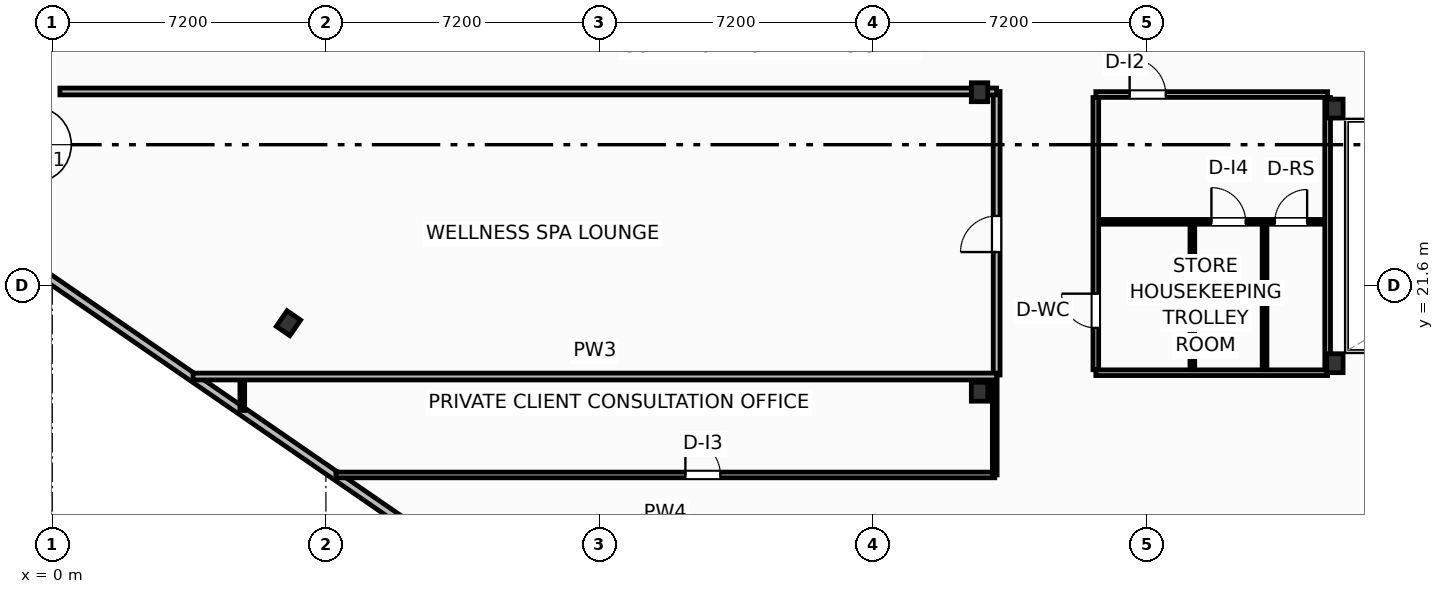
"""IFC4 building model, lengths in metres.
Left out: names, types, materials, properties, quantities, classifications, styles, units other than length and angle.
Written with IfcOpenShell. Run it as: python <this file> out.ifc"""

import sys

from ifc_helpers import new_model, si_unit, direction, frame, frame_2d, origin, origin_2d, place, context, subcontext, project, spatial, rectangle, i_section, extrude, element, fill, save


model = new_model("IFC4")
c1 = context("Model", 3, precision=1e-05, world=origin(), true_north=direction((0.0, 1.0)))
c2 = subcontext(c1, "Body", "Model", "MODEL_VIEW")
j1 = project(units=[si_unit("LENGTHUNIT", "METRE"), si_unit("PLANEANGLEUNIT", "RADIAN")], contexts=[c1])
p1 = place(None, origin())
s1 = spatial("IfcSite", under=j1, at=p1, CompositionType="ELEMENT")
p2 = place(p1, origin())
s2 = spatial("IfcBuilding", under=s1, at=p2, CompositionType="ELEMENT")
p3 = place(p2, frame((0.0, 0.0, 60.3)))
s3 = spatial("IfcBuildingStorey", under=s2, at=p3, CompositionType="ELEMENT", Elevation=60.3)
for number, where, z_axis, x_axis in (
    (1, (33.75, 19.55, 0.0), (0.0, 0.0, 1.0), (1.0, 0.0, 0.0)),
    (2, (33.75, 26.25, 0.0), (0.0, 0.0, 1.0), (1.0, 0.0, 0.0)),
    (3, (24.4, 18.8, 0.0), (0.0, 0.0, 1.0), (1.0, 0.0, 0.0)),
    (4, (24.4, 26.68, 0.0), (0.0, 0.0, 1.0), (1.0, 0.0, 0.0)),
    (5, (6.215, 20.603, 0.0), (0.0, 0.0, 1.0), (0.824, -0.567, 0.0)),
):
    element("IfcColumn", number, at=place(p3, frame(where, z_axis=z_axis, x_axis=x_axis)), inside=s3, PredefinedType="COLUMN", context=c2, shape_type="SweptSolid", body=[
        extrude(i_section(OverallWidth=0.432, OverallDepth=0.498, WebThickness=0.056, FlangeThickness=0.089, FilletRadius=0.025, at=origin_2d()), origin(), (0.0, 0.0, 1.0), 3.7),
    ])
p4 = place(p3, frame((-2.728, 23.605, 0.0), z_axis=(0.0, 0.0, 1.0), x_axis=(0.823535075462, -0.567265351915, 0.0)))
e6 = element("IfcWall", 6, at=p4, inside=s3, PredefinedType="SOLIDWALL", context=c2, shape_type="SweptSolid", body=[
    extrude(rectangle(XDim=23.247, YDim=0.22, at=frame_2d((11.624, 0.0))), origin(), (0.0, 0.0, 1.0), 2.73),
])
p5 = place(p4, frame((15.55, 0.0, 0.8)))
e7 = element("IfcOpeningElement", 7, at=p5, cuts=e6, PredefinedType="OPENING", context=c2, shape_type="SweptSolid", body=[
    extrude(rectangle(XDim=1.65, YDim=1.65, at=frame_2d((0.825, 0.825))), frame((0.0, 0.12, 0.0), z_axis=(0.0, -1.0, 0.0), x_axis=(1.0, 0.0, 0.0)), (0.0, 0.0, 1.0), 0.24),
])
p6 = place(p3, frame((7.463, 16.61, 0.0), z_axis=(0.0, 0.0, 1.0), x_axis=(1.0, 0.0, 0.0)))
e8 = element("IfcWall", 8, at=p6, inside=s3, PredefinedType="PARTITIONING", context=c2, shape_type="SweptSolid", body=[
    extrude(rectangle(XDim=17.337, YDim=0.15, at=frame_2d((8.668, 0.0))), origin(), (0.0, 0.0, 1.0), 3.45),
])
p7 = place(p6, frame((9.197, 0.0, 0.0)))
e9 = element("IfcOpeningElement", 9, at=p7, cuts=e8, PredefinedType="OPENING", context=c2, shape_type="SweptSolid", body=[
    extrude(rectangle(XDim=0.92, YDim=2.05, at=frame_2d((0.46, 1.025))), frame((0.0, 0.085, 0.0), z_axis=(0.0, -1.0, 0.0), x_axis=(1.0, 0.0, 0.0)), (0.0, 0.0, 1.0), 0.17),
])
p8 = place(p3, frame((5.0, 18.306, 0.0), z_axis=(0.0, 0.0, 1.0), x_axis=(0.0, 1.0, 0.0)))
e10 = element("IfcWall", 10, at=p8, inside=s3, PredefinedType="PARTITIONING", context=c2, shape_type="SweptSolid", body=[
    extrude(rectangle(XDim=0.934, YDim=0.125, at=frame_2d((0.467, 0.0))), origin(), (0.0, 0.0, 1.0), 3.45),
])
p9 = place(p3, frame((24.8, 16.61, 0.0), z_axis=(0.0, 0.0, 1.0), x_axis=(0.0, 1.0, 0.0)))
e11 = element("IfcWall", 11, at=p9, inside=s3, PredefinedType="PARTITIONING", context=c2, shape_type="SweptSolid", body=[
    extrude(rectangle(XDim=2.63, YDim=0.125, at=frame_2d((1.315, 0.0))), origin(), (0.0, 0.0, 1.0), 2.58),
])
p10 = place(p3, frame((24.85, 19.24, 0.0), z_axis=(0.0, 0.0, 1.0), x_axis=(0.0, 1.0, 0.0)))
e12 = element("IfcWall", 12, at=p10, inside=s3, PredefinedType="PARTITIONING", context=c2, shape_type="SweptSolid", body=[
    extrude(rectangle(XDim=7.46, YDim=0.18, at=frame_2d((3.73, 0.0))), origin(), (0.0, 0.0, 1.0), 3.45),
])
p11 = place(p10, frame((3.235, 0.0, 0.0)))
e13 = element("IfcOpeningElement", 13, at=p11, cuts=e12, PredefinedType="OPENING", context=c2, shape_type="SweptSolid", body=[
    extrude(rectangle(XDim=0.95, YDim=2.05, at=frame_2d((0.475, 1.025))), frame((0.0, 0.1, 0.0), z_axis=(0.0, -1.0, 0.0), x_axis=(1.0, 0.0, 0.0)), (0.0, 0.0, 1.0), 0.2),
])
p12 = place(p3, frame((3.703, 19.2, 0.0), z_axis=(0.0, 0.0, 1.0), x_axis=(1.0, 0.0, 0.0)))
e14 = element("IfcWall", 14, at=p12, inside=s3, PredefinedType="PARTITIONING", context=c2, shape_type="SweptSolid", body=[
    extrude(rectangle(XDim=21.147, YDim=0.18, at=frame_2d((10.574, 0.0))), origin(), (0.0, 0.0, 1.0), 2.58),
])
p13 = place(p3, frame((0.2, 26.7, 0.0), z_axis=(0.0, 0.0, 1.0), x_axis=(1.0, 0.0, 0.0)))
e15 = element("IfcWall", 15, at=p13, inside=s3, PredefinedType="PARTITIONING", context=c2, shape_type="SweptSolid", body=[
    extrude(rectangle(XDim=24.65, YDim=0.18, at=frame_2d((12.325, 0.0))), origin(), (0.0, 0.0, 1.0), 2.662),
])
p14 = place(p3, frame((27.46, 26.62, 0.0), z_axis=(0.0, 0.0, 1.0), x_axis=(1.0, 0.0, 0.0)))
e16 = element("IfcWall", 16, at=p14, inside=s3, PredefinedType="PARTITIONING", context=c2, shape_type="SweptSolid", body=[
    extrude(rectangle(XDim=6.1, YDim=0.15, at=frame_2d((3.05, 0.0))), origin(), (0.0, 0.0, 1.0), 2.662),
])
p15 = place(p14, frame((0.89, 0.0, 0.0)))
e17 = element("IfcOpeningElement", 17, at=p15, cuts=e16, PredefinedType="OPENING", context=c2, shape_type="SweptSolid", body=[
    extrude(rectangle(XDim=0.95, YDim=2.05, at=frame_2d((0.475, 1.025))), frame((0.0, 0.085, 0.0), z_axis=(0.0, -1.0, 0.0), x_axis=(1.0, 0.0, 0.0)), (0.0, 0.0, 1.0), 0.17),
])
p16 = place(p3, frame((27.46, 19.3, 0.0), z_axis=(0.0, 0.0, 1.0), x_axis=(1.0, 0.0, 0.0)))
e18 = element("IfcWall", 18, at=p16, inside=s3, PredefinedType="PARTITIONING", context=c2, shape_type="SweptSolid", body=[
    extrude(rectangle(XDim=6.1, YDim=0.15, at=frame_2d((3.05, 0.0))), origin(), (0.0, 0.0, 1.0), 2.662),
])
p17 = place(p3, frame((27.52, 23.27, 0.0), z_axis=(0.0, 0.0, 1.0), x_axis=(1.0, 0.0, 0.0)))
e19 = element("IfcWall", 19, at=p17, inside=s3, PredefinedType="PARTITIONING", context=c2, shape_type="SweptSolid", body=[
    extrude(rectangle(XDim=6.0, YDim=0.125, at=frame_2d((3.0, 0.0))), origin(), (0.0, 0.0, 1.0), 3.45),
])
p18 = place(p17, frame((2.982, 0.0, 0.0)))
e20 = element("IfcOpeningElement", 20, at=p18, cuts=e19, PredefinedType="OPENING", context=c2, shape_type="SweptSolid", body=[
    extrude(rectangle(XDim=0.9, YDim=2.05, at=frame_2d((0.45, 1.025))), frame((0.0, 0.073, 0.0), z_axis=(0.0, -1.0, 0.0), x_axis=(1.0, 0.0, 0.0)), (0.0, 0.0, 1.0), 0.145),
])
p19 = place(p17, frame((4.65, 0.0, 0.0)))
e21 = element("IfcOpeningElement", 21, at=p19, cuts=e19, PredefinedType="OPENING", context=c2, shape_type="SweptSolid", body=[
    extrude(rectangle(XDim=0.85, YDim=2.05, at=frame_2d((0.425, 1.025))), frame((0.0, 0.073, 0.0), z_axis=(0.0, -1.0, 0.0), x_axis=(1.0, 0.0, 0.0)), (0.0, 0.0, 1.0), 0.145),
])
for number, where, z_axis, x_axis in (
    (22, (30.0, 19.38, 0.0), (0.0, 0.0, 1.0), (0.0, 1.0, 0.0)),
    (23, (31.9, 19.38, 0.0), (0.0, 0.0, 1.0), (0.0, 1.0, 0.0)),
):
    element("IfcWall", number, at=place(p3, frame(where, z_axis=z_axis, x_axis=x_axis)), inside=s3, PredefinedType="PARTITIONING", context=c2, shape_type="SweptSolid", body=[
        extrude(rectangle(XDim=3.82, YDim=0.125, at=frame_2d((1.91, 0.0))), origin(), (0.0, 0.0, 1.0), 3.45),
    ])
p20 = place(p3, frame((27.46, 19.38, 0.0), z_axis=(0.0, 0.0, 1.0), x_axis=(0.0, 1.0, 0.0)))
e24 = element("IfcWall", 24, at=p20, inside=s3, PredefinedType="PARTITIONING", context=c2, shape_type="SweptSolid", body=[
    extrude(rectangle(XDim=7.16, YDim=0.15, at=frame_2d((3.58, 0.0))), origin(), (0.0, 0.0, 1.0), 3.45),
])
p21 = place(p20, frame((1.1, 0.0, 0.0)))
e25 = element("IfcOpeningElement", 25, at=p21, cuts=e24, PredefinedType="OPENING", context=c2, shape_type="SweptSolid", body=[
    extrude(rectangle(XDim=0.9, YDim=2.05, at=frame_2d((0.45, 1.025))), frame((0.0, 0.085, 0.0), z_axis=(0.0, -1.0, 0.0), x_axis=(1.0, 0.0, 0.0)), (0.0, 0.0, 1.0), 0.17),
])
p22 = place(p3, frame((33.56, 19.38, 0.0), z_axis=(0.0, 0.0, 1.0), x_axis=(0.0, 1.0, 0.0)))
e26 = element("IfcWall", 26, at=p22, inside=s3, PredefinedType="PARTITIONING", context=c2, shape_type="SweptSolid", body=[
    extrude(rectangle(XDim=7.16, YDim=0.15, at=frame_2d((3.58, 0.0))), origin(), (0.0, 0.0, 1.0), 2.824),
])
p23 = place(p7, origin())
e27 = element("IfcDoor", 27, at=p23, inside=s3, OperationType="SINGLE_SWING_LEFT", PredefinedType="DOOR", context=c2, shape_type="SweptSolid", body=[
    extrude(rectangle(XDim=0.92, YDim=2.05, at=frame_2d((0.46, 1.025))), frame((0.0, 0.025, 0.0), z_axis=(0.0, -1.0, 0.0), x_axis=(1.0, 0.0, 0.0)), (0.0, 0.0, 1.0), 0.05),
])
fill(e9, e27)
p24 = place(p11, origin())
e28 = element("IfcDoor", 28, at=p24, inside=s3, OperationType="SINGLE_SWING_LEFT", PredefinedType="DOOR", context=c2, shape_type="SweptSolid", body=[
    extrude(rectangle(XDim=0.95, YDim=2.05, at=frame_2d((0.475, 1.025))), frame((0.0, 0.025, 0.0), z_axis=(0.0, -1.0, 0.0), x_axis=(1.0, 0.0, 0.0)), (0.0, 0.0, 1.0), 0.05),
])
fill(e13, e28)
p25 = place(p15, origin())
e29 = element("IfcDoor", 29, at=p25, inside=s3, OperationType="SINGLE_SWING_LEFT", PredefinedType="DOOR", context=c2, shape_type="SweptSolid", body=[
    extrude(rectangle(XDim=0.95, YDim=2.05, at=frame_2d((0.475, 1.025))), frame((0.0, 0.025, 0.0), z_axis=(0.0, -1.0, 0.0), x_axis=(1.0, 0.0, 0.0)), (0.0, 0.0, 1.0), 0.05),
])
fill(e17, e29)
p26 = place(p18, origin())
e30 = element("IfcDoor", 30, at=p26, inside=s3, OperationType="SINGLE_SWING_LEFT", PredefinedType="DOOR", context=c2, shape_type="SweptSolid", body=[
    extrude(rectangle(XDim=0.9, YDim=2.05, at=frame_2d((0.45, 1.025))), frame((0.0, 0.025, 0.0), z_axis=(0.0, -1.0, 0.0), x_axis=(1.0, 0.0, 0.0)), (0.0, 0.0, 1.0), 0.05),
])
fill(e20, e30)
p27 = place(p19, origin())
e31 = element("IfcDoor", 31, at=p27, inside=s3, OperationType="SINGLE_SWING_RIGHT", PredefinedType="DOOR", context=c2, shape_type="SweptSolid", body=[
    extrude(rectangle(XDim=0.85, YDim=2.05, at=frame_2d((0.425, 1.025))), frame((0.0, 0.025, 0.0), z_axis=(0.0, -1.0, 0.0), x_axis=(1.0, 0.0, 0.0)), (0.0, 0.0, 1.0), 0.05),
])
fill(e21, e31)
p28 = place(p21, origin())
e32 = element("IfcDoor", 32, at=p28, inside=s3, OperationType="SINGLE_SWING_RIGHT", PredefinedType="DOOR", context=c2, shape_type="SweptSolid", body=[
    extrude(rectangle(XDim=0.9, YDim=2.05, at=frame_2d((0.45, 1.025))), frame((0.0, 0.025, 0.0), z_axis=(0.0, -1.0, 0.0), x_axis=(1.0, 0.0, 0.0)), (0.0, 0.0, 1.0), 0.05),
])
fill(e25, e32)
save(model, sys.argv[1])
